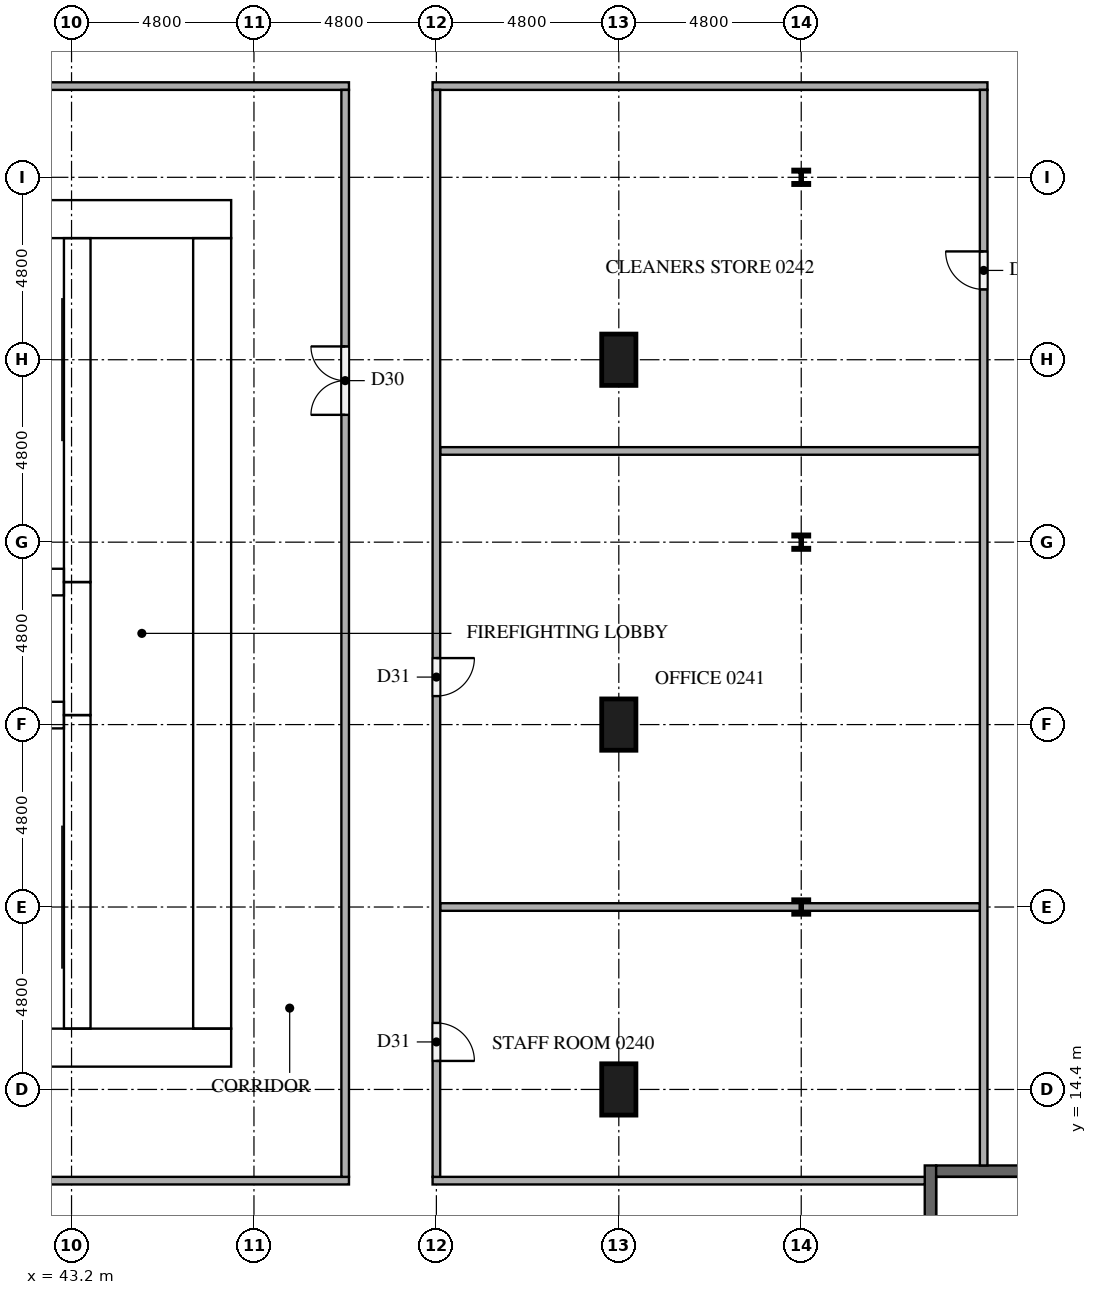
"""IFC4 building model, lengths in metres.
Left out: names, types, materials, properties, quantities, classifications, styles, units other than length and angle.
Written with IfcOpenShell. Run it as: python <this file> out.ifc"""

import sys

from ifc_helpers import new_model, si_unit, direction, frame, frame_2d, origin, origin_2d, place, context, subcontext, project, spatial, rectangle, i_section, extrude, element, fill, save


model = new_model("IFC4")
c1 = context("Model", 3, precision=1e-05, world=origin(), true_north=direction((0.0, 1.0)))
c2 = subcontext(c1, "Body", "Model", "MODEL_VIEW")
j1 = project(units=[si_unit("LENGTHUNIT", "METRE"), si_unit("PLANEANGLEUNIT", "RADIAN")], contexts=[c1])
p1 = place(None, origin())
s1 = spatial("IfcSite", under=j1, at=p1, CompositionType="ELEMENT")
p2 = place(p1, origin())
s2 = spatial("IfcBuilding", under=s1, at=p2, CompositionType="ELEMENT")
p3 = place(p2, frame((0.0, 0.0, 10.5)))
s3 = spatial("IfcBuildingStorey", under=s2, at=p3, CompositionType="ELEMENT", Elevation=10.5)
p4 = place(p3, frame((65.8, 4.4, 0.0), z_axis=(0.0, 0.0, 1.0), x_axis=(0.0, 1.0, 0.0)))
e1 = element("IfcWall", 1, at=p4, inside=s3, PredefinedType="SOLIDWALL", context=c2, shape_type="SweptSolid", body=[
    extrude(rectangle(XDim=8.0, YDim=0.3, at=frame_2d((4.0, 0.0))), origin(), (0.0, 0.0, 1.0), 4.2),
])
p5 = place(p4, frame((0.4, 0.0, 0.0)))
e2 = element("IfcOpeningElement", 2, at=p5, cuts=e1, PredefinedType="OPENING", context=c2, shape_type="SweptSolid", body=[
    extrude(rectangle(XDim=1.4, YDim=2.1, at=frame_2d((0.7, 1.05))), frame((0.0, 0.16, 0.0), z_axis=(0.0, -1.0, 0.0), x_axis=(1.0, 0.0, 0.0)), (0.0, 0.0, 1.0), 0.32),
])
p6 = place(p3, frame((65.95, 12.25, 0.0), z_axis=(0.0, 0.0, 1.0), x_axis=(1.0, 0.0, 0.0)))
e3 = element("IfcWall", 3, at=p6, inside=s3, PredefinedType="SOLIDWALL", context=c2, shape_type="SweptSolid", body=[
    extrude(rectangle(XDim=3.35, YDim=0.3, at=frame_2d((1.675, 0.0))), origin(), (0.0, 0.0, 1.0), 4.2),
])
p7 = place(p3, frame((15.0, 15.5, 0.0), z_axis=(0.0, 0.0, 1.0), x_axis=(1.0, 0.0, 0.0)))
e4 = element("IfcWall", 4, at=p7, inside=s3, PredefinedType="SHEAR", context=c2, shape_type="SweptSolid", body=[
    extrude(rectangle(XDim=32.4, YDim=1.0, at=frame_2d((16.2, 0.0))), origin(), (0.0, 0.0, 1.0), 4.2),
])
p8 = place(p7, frame((15.3, 0.0, 0.0)))
e5 = element("IfcOpeningElement", 5, at=p8, cuts=e4, PredefinedType="OPENING", context=c2, shape_type="SweptSolid", body=[
    extrude(rectangle(XDim=1.8, YDim=2.1, at=frame_2d((0.9, 1.05))), frame((0.0, 0.51, 0.0), z_axis=(0.0, -1.0, 0.0), x_axis=(1.0, 0.0, 0.0)), (0.0, 0.0, 1.0), 1.02),
])
p9 = place(p3, frame((15.0, 37.3, 0.0), z_axis=(0.0, 0.0, 1.0), x_axis=(1.0, 0.0, 0.0)))
e6 = element("IfcWall", 6, at=p9, inside=s3, PredefinedType="SHEAR", context=c2, shape_type="SweptSolid", body=[
    extrude(rectangle(XDim=32.4, YDim=1.0, at=frame_2d((16.2, 0.0))), origin(), (0.0, 0.0, 1.0), 4.2),
])
p10 = place(p9, frame((15.3, 0.0, 0.0)))
e7 = element("IfcOpeningElement", 7, at=p10, cuts=e6, PredefinedType="OPENING", context=c2, shape_type="SweptSolid", body=[
    extrude(rectangle(XDim=1.8, YDim=2.1, at=frame_2d((0.9, 1.05))), frame((0.0, 0.51, 0.0), z_axis=(0.0, -1.0, 0.0), x_axis=(1.0, 0.0, 0.0)), (0.0, 0.0, 1.0), 1.02),
])
p11 = place(p9, frame((1.766, 0.0, 0.0)))
e8 = element("IfcOpeningElement", 8, at=p11, cuts=e6, PredefinedType="OPENING", context=c2, shape_type="SweptSolid", body=[
    extrude(rectangle(XDim=1.0, YDim=2.1, at=frame_2d((0.5, 1.05))), frame((0.0, 0.51, 0.0), z_axis=(0.0, -1.0, 0.0), x_axis=(1.0, 0.0, 0.0)), (0.0, 0.0, 1.0), 1.02),
])
p12 = place(p9, frame((5.241, 0.0, 0.0)))
e9 = element("IfcOpeningElement", 9, at=p12, cuts=e6, PredefinedType="OPENING", context=c2, shape_type="SweptSolid", body=[
    extrude(rectangle(XDim=1.0, YDim=2.1, at=frame_2d((0.5, 1.05))), frame((0.0, 0.51, 0.0), z_axis=(0.0, -1.0, 0.0), x_axis=(1.0, 0.0, 0.0)), (0.0, 0.0, 1.0), 1.02),
])
p13 = place(p3, frame((46.9, 16.0, 0.0), z_axis=(0.0, 0.0, 1.0), x_axis=(0.0, 1.0, 0.0)))
e10 = element("IfcWall", 10, at=p13, inside=s3, PredefinedType="SHEAR", context=c2, shape_type="SweptSolid", body=[
    extrude(rectangle(XDim=20.8, YDim=1.0, at=frame_2d((10.4, 0.0))), origin(), (0.0, 0.0, 1.0), 4.2),
])
p14 = place(p13, frame((10.1, 0.0, 0.0)))
e11 = element("IfcOpeningElement", 11, at=p14, cuts=e10, PredefinedType="OPENING", context=c2, shape_type="SweptSolid", body=[
    extrude(rectangle(XDim=1.2, YDim=2.1, at=frame_2d((0.6, 1.05))), frame((0.0, 0.51, 0.0), z_axis=(0.0, -1.0, 0.0), x_axis=(1.0, 0.0, 0.0)), (0.0, 0.0, 1.0), 1.02),
])
p15 = place(p3, frame((43.35, 16.0, 0.0), z_axis=(0.0, 0.0, 1.0), x_axis=(0.0, 1.0, 0.0)))
e12 = element("IfcWall", 12, at=p15, inside=s3, PredefinedType="SHEAR", context=c2, shape_type="SweptSolid", body=[
    extrude(rectangle(XDim=8.25, YDim=0.7, at=frame_2d((4.125, 0.0))), origin(), (0.0, 0.0, 1.0), 4.2),
])
p16 = place(p15, frame((0.2, 0.0, 0.0)))
e13 = element("IfcOpeningElement", 13, at=p16, cuts=e12, PredefinedType="OPENING", context=c2, shape_type="SweptSolid", body=[
    extrude(rectangle(XDim=1.2, YDim=2.1, at=frame_2d((0.6, 1.05))), frame((0.0, 0.36, 0.0), z_axis=(0.0, -1.0, 0.0), x_axis=(1.0, 0.0, 0.0)), (0.0, 0.0, 1.0), 0.72),
])
p17 = place(p3, frame((43.35, 24.25, 0.0), z_axis=(0.0, 0.0, 1.0), x_axis=(0.0, 1.0, 0.0)))
e14 = element("IfcWall", 14, at=p17, inside=s3, PredefinedType="SHEAR", context=c2, shape_type="SweptSolid", body=[
    extrude(rectangle(XDim=3.5, YDim=0.7, at=frame_2d((1.75, 0.0))), origin(), (0.0, 0.0, 1.0), 4.2),
])
p18 = place(p17, frame((1.2, 0.0, 0.0)))
e15 = element("IfcOpeningElement", 15, at=p18, cuts=e14, PredefinedType="OPENING", context=c2, shape_type="SweptSolid", body=[
    extrude(rectangle(XDim=1.1, YDim=2.1, at=frame_2d((0.55, 1.05))), frame((0.0, 0.36, 0.0), z_axis=(0.0, -1.0, 0.0), x_axis=(1.0, 0.0, 0.0)), (0.0, 0.0, 1.0), 0.72),
])
p19 = place(p3, frame((43.35, 27.75, 0.0), z_axis=(0.0, 0.0, 1.0), x_axis=(0.0, 1.0, 0.0)))
e16 = element("IfcWall", 16, at=p19, inside=s3, PredefinedType="SHEAR", context=c2, shape_type="SweptSolid", body=[
    extrude(rectangle(XDim=9.05, YDim=0.7, at=frame_2d((4.525, 0.0))), origin(), (0.0, 0.0, 1.0), 4.2),
])
p20 = place(p19, frame((7.65, 0.0, 0.0)))
e17 = element("IfcOpeningElement", 17, at=p20, cuts=e16, PredefinedType="OPENING", context=c2, shape_type="SweptSolid", body=[
    extrude(rectangle(XDim=1.2, YDim=2.1, at=frame_2d((0.6, 1.05))), frame((0.0, 0.36, 0.0), z_axis=(0.0, -1.0, 0.0), x_axis=(1.0, 0.0, 0.0)), (0.0, 0.0, 1.0), 0.72),
])
for number, where, z_axis, x_axis in (
    (18, (39.65, 24.25, 0.0), (0.0, 0.0, 1.0), (1.0, 0.0, 0.0)),
    (19, (39.65, 27.75, 0.0), (0.0, 0.0, 1.0), (1.0, 0.0, 0.0)),
):
    element("IfcWall", number, at=place(p3, frame(where, z_axis=z_axis, x_axis=x_axis)), inside=s3, PredefinedType="SHEAR", context=c2, shape_type="SweptSolid", body=[
        extrude(rectangle(XDim=3.35, YDim=0.7, at=frame_2d((1.675, 0.0))), origin(), (0.0, 0.0, 1.0), 4.2),
    ])
for number, where, z_axis, x_axis in (
    (20, (57.6, 14.4, 0.0), (0.0, 0.0, 1.0), (0.0, 1.0, 0.0)),
    (21, (57.6, 24.0, 0.0), (0.0, 0.0, 1.0), (0.0, 1.0, 0.0)),
    (22, (57.6, 33.6, 0.0), (0.0, 0.0, 1.0), (0.0, 1.0, 0.0)),
):
    element("IfcColumn", number, at=place(p3, frame(where, z_axis=z_axis, x_axis=x_axis)), inside=s3, PredefinedType="COLUMN", context=c2, shape_type="SweptSolid", body=[
        extrude(rectangle(XDim=1.35, YDim=0.9, at=origin_2d()), origin(), (0.0, 0.0, 1.0), 4.2),
    ])
for number, where, z_axis, x_axis in (
    (23, (62.4, 19.2, 0.0), (0.0, 0.0, 1.0), (1.0, 0.0, 0.0)),
    (24, (62.4, 28.8, 0.0), (0.0, 0.0, 1.0), (1.0, 0.0, 0.0)),
    (25, (62.4, 38.4, 0.0), (0.0, 0.0, 1.0), (1.0, 0.0, 0.0)),
):
    element("IfcColumn", number, at=place(p3, frame(where, z_axis=z_axis, x_axis=x_axis)), inside=s3, PredefinedType="COLUMN", context=c2, shape_type="SweptSolid", body=[
        extrude(i_section(OverallWidth=0.396, OverallDepth=0.381, WebThickness=0.019, FlangeThickness=0.03, at=origin_2d()), origin(), (0.0, 0.0, 1.0), 4.2),
    ])
p21 = place(p3, frame((11.9, 12.0, 0.0), z_axis=(0.0, 0.0, 1.0), x_axis=(1.0, 0.0, 0.0)))
e26 = element("IfcWall", 26, at=p21, inside=s3, PredefinedType="PARTITIONING", context=c2, shape_type="SweptSolid", body=[
    extrude(rectangle(XDim=38.6, YDim=0.2, at=frame_2d((19.3, 0.0))), origin(), (0.0, 0.0, 1.0), 4.2),
])
p22 = place(p21, frame((18.45, 0.0, 0.0)))
e27 = element("IfcOpeningElement", 27, at=p22, cuts=e26, PredefinedType="OPENING", context=c2, shape_type="SweptSolid", body=[
    extrude(rectangle(XDim=1.8, YDim=2.1, at=frame_2d((0.9, 1.05))), frame((0.0, 0.11, 0.0), z_axis=(0.0, -1.0, 0.0), x_axis=(1.0, 0.0, 0.0)), (0.0, 0.0, 1.0), 0.22),
])
p23 = place(p3, frame((52.7, 12.0, 0.0), z_axis=(0.0, 0.0, 1.0), x_axis=(1.0, 0.0, 0.0)))
e28 = element("IfcWall", 28, at=p23, inside=s3, PredefinedType="PARTITIONING", context=c2, shape_type="SweptSolid", body=[
    extrude(rectangle(XDim=12.95, YDim=0.2, at=frame_2d((6.475, 0.0))), origin(), (0.0, 0.0, 1.0), 4.2),
])
for number, where, z_axis, x_axis in (
    (29, (52.9, 19.2, 0.0), (0.0, 0.0, 1.0), (1.0, 0.0, 0.0)),
    (30, (52.9, 31.2, 0.0), (0.0, 0.0, 1.0), (1.0, 0.0, 0.0)),
):
    element("IfcWall", number, at=place(p3, frame(where, z_axis=z_axis, x_axis=x_axis)), inside=s3, PredefinedType="PARTITIONING", context=c2, shape_type="SweptSolid", body=[
        extrude(rectangle(XDim=14.2, YDim=0.2, at=frame_2d((7.1, 0.0))), origin(), (0.0, 0.0, 1.0), 4.2),
    ])
p24 = place(p3, frame((50.5, 40.8, 0.0), z_axis=(0.0, 0.0, 1.0), x_axis=(-1.0, 0.0, 0.0)))
e31 = element("IfcWall", 31, at=p24, inside=s3, PredefinedType="PARTITIONING", context=c2, shape_type="SweptSolid", body=[
    extrude(rectangle(XDim=38.6, YDim=0.2, at=frame_2d((19.3, 0.0))), origin(), (0.0, 0.0, 1.0), 4.2),
])
p25 = place(p24, frame((18.45, 0.0, 0.0)))
e32 = element("IfcOpeningElement", 32, at=p25, cuts=e31, PredefinedType="OPENING", context=c2, shape_type="SweptSolid", body=[
    extrude(rectangle(XDim=1.8, YDim=2.1, at=frame_2d((0.9, 1.05))), frame((0.0, 0.11, 0.0), z_axis=(0.0, -1.0, 0.0), x_axis=(1.0, 0.0, 0.0)), (0.0, 0.0, 1.0), 0.22),
])
p26 = place(p24, frame((16.25, 0.0, 0.0)))
e33 = element("IfcOpeningElement", 33, at=p26, cuts=e31, PredefinedType="OPENING", context=c2, shape_type="SweptSolid", body=[
    extrude(rectangle(XDim=1.8, YDim=2.1, at=frame_2d((0.9, 1.05))), frame((0.0, 0.11, 0.0), z_axis=(0.0, -1.0, 0.0), x_axis=(1.0, 0.0, 0.0)), (0.0, 0.0, 1.0), 0.22),
])
p27 = place(p3, frame((52.7, 40.8, 0.0), z_axis=(0.0, 0.0, 1.0), x_axis=(1.0, 0.0, 0.0)))
e34 = element("IfcWall", 34, at=p27, inside=s3, PredefinedType="PARTITIONING", context=c2, shape_type="SweptSolid", body=[
    extrude(rectangle(XDim=14.6, YDim=0.2, at=frame_2d((7.3, 0.0))), origin(), (0.0, 0.0, 1.0), 4.2),
])
p28 = place(p3, frame((50.4, 12.1, 0.0), z_axis=(0.0, 0.0, 1.0), x_axis=(0.0, 1.0, 0.0)))
e35 = element("IfcWall", 35, at=p28, inside=s3, PredefinedType="PARTITIONING", context=c2, shape_type="SweptSolid", body=[
    extrude(rectangle(XDim=28.6, YDim=0.2, at=frame_2d((14.3, 0.0))), origin(), (0.0, 0.0, 1.0), 4.2),
])
p29 = place(p28, frame((20.05, 0.0, 0.0)))
e36 = element("IfcOpeningElement", 36, at=p29, cuts=e35, PredefinedType="OPENING", context=c2, shape_type="SweptSolid", body=[
    extrude(rectangle(XDim=1.8, YDim=2.1, at=frame_2d((0.9, 1.05))), frame((0.0, 0.11, 0.0), z_axis=(0.0, -1.0, 0.0), x_axis=(1.0, 0.0, 0.0)), (0.0, 0.0, 1.0), 0.22),
])
p30 = place(p3, frame((52.8, 40.7, 0.0), z_axis=(0.0, 0.0, 1.0), x_axis=(0.0, -1.0, 0.0)))
e37 = element("IfcWall", 37, at=p30, inside=s3, PredefinedType="PARTITIONING", context=c2, shape_type="SweptSolid", body=[
    extrude(rectangle(XDim=28.6, YDim=0.2, at=frame_2d((14.3, 0.0))), origin(), (0.0, 0.0, 1.0), 4.2),
])
p31 = place(p30, frame((24.55, 0.0, 0.0)))
e38 = element("IfcOpeningElement", 38, at=p31, cuts=e37, PredefinedType="OPENING", context=c2, shape_type="SweptSolid", body=[
    extrude(rectangle(XDim=1.0, YDim=2.1, at=frame_2d((0.5, 1.05))), frame((0.0, 0.11, 0.0), z_axis=(0.0, -1.0, 0.0), x_axis=(1.0, 0.0, 0.0)), (0.0, 0.0, 1.0), 0.22),
])
p32 = place(p30, frame((14.95, 0.0, 0.0)))
e39 = element("IfcOpeningElement", 39, at=p32, cuts=e37, PredefinedType="OPENING", context=c2, shape_type="SweptSolid", body=[
    extrude(rectangle(XDim=1.0, YDim=2.1, at=frame_2d((0.5, 1.05))), frame((0.0, 0.11, 0.0), z_axis=(0.0, -1.0, 0.0), x_axis=(1.0, 0.0, 0.0)), (0.0, 0.0, 1.0), 0.22),
])
p33 = place(p3, frame((67.2, 12.4, 0.0), z_axis=(0.0, 0.0, 1.0), x_axis=(0.0, 1.0, 0.0)))
e40 = element("IfcWall", 40, at=p33, inside=s3, PredefinedType="PARTITIONING", context=c2, shape_type="SweptSolid", body=[
    extrude(rectangle(XDim=28.3, YDim=0.2, at=frame_2d((14.15, 0.0))), origin(), (0.0, 0.0, 1.0), 4.2),
])
p34 = place(p33, frame((23.05, 0.0, 0.0)))
e41 = element("IfcOpeningElement", 41, at=p34, cuts=e40, PredefinedType="OPENING", context=c2, shape_type="SweptSolid", body=[
    extrude(rectangle(XDim=1.0, YDim=2.1, at=frame_2d((0.5, 1.05))), frame((0.0, 0.11, 0.0), z_axis=(0.0, -1.0, 0.0), x_axis=(1.0, 0.0, 0.0)), (0.0, 0.0, 1.0), 0.22),
])
p35 = place(p18, origin())
e42 = element("IfcDoor", 42, at=p35, inside=s3, OperationType="DOUBLE_DOOR_SLIDING", PredefinedType="DOOR", context=c2, shape_type="SweptSolid", body=[
    extrude(rectangle(XDim=1.1, YDim=2.1, at=frame_2d((0.55, 1.05))), frame((0.0, 0.025, 0.0), z_axis=(0.0, -1.0, 0.0), x_axis=(1.0, 0.0, 0.0)), (0.0, 0.0, 1.0), 0.05),
])
fill(e15, e42)
p36 = place(p16, origin())
e43 = element("IfcDoor", 43, at=p36, inside=s3, OperationType="SINGLE_SWING_LEFT", PredefinedType="DOOR", context=c2, shape_type="SweptSolid", body=[
    extrude(rectangle(XDim=1.2, YDim=2.1, at=frame_2d((0.6, 1.05))), frame((0.0, 0.025, 0.0), z_axis=(0.0, -1.0, 0.0), x_axis=(1.0, 0.0, 0.0)), (0.0, 0.0, 1.0), 0.05),
])
fill(e13, e43)
p37 = place(p20, origin())
e44 = element("IfcDoor", 44, at=p37, inside=s3, OperationType="SINGLE_SWING_RIGHT", PredefinedType="DOOR", context=c2, shape_type="SweptSolid", body=[
    extrude(rectangle(XDim=1.2, YDim=2.1, at=frame_2d((0.6, 1.05))), frame((0.0, 0.025, 0.0), z_axis=(0.0, -1.0, 0.0), x_axis=(1.0, 0.0, 0.0)), (0.0, 0.0, 1.0), 0.05),
])
fill(e17, e44)
p38 = place(p14, origin())
e45 = element("IfcDoor", 45, at=p38, inside=s3, OperationType="SINGLE_SWING_RIGHT", PredefinedType="DOOR", context=c2, shape_type="SweptSolid", body=[
    extrude(rectangle(XDim=1.2, YDim=2.1, at=frame_2d((0.6, 1.05))), frame((0.0, 0.025, 0.0), z_axis=(0.0, -1.0, 0.0), x_axis=(1.0, 0.0, 0.0)), (0.0, 0.0, 1.0), 0.05),
])
fill(e11, e45)
p39 = place(p31, origin())
e46 = element("IfcDoor", 46, at=p39, inside=s3, OperationType="SINGLE_SWING_RIGHT", PredefinedType="DOOR", context=c2, shape_type="SweptSolid", body=[
    extrude(rectangle(XDim=1.0, YDim=2.1, at=frame_2d((0.5, 1.05))), frame((0.0, 0.025, 0.0), z_axis=(0.0, -1.0, 0.0), x_axis=(1.0, 0.0, 0.0)), (0.0, 0.0, 1.0), 0.05),
])
fill(e38, e46)
p40 = place(p32, origin())
e47 = element("IfcDoor", 47, at=p40, inside=s3, OperationType="SINGLE_SWING_LEFT", PredefinedType="DOOR", context=c2, shape_type="SweptSolid", body=[
    extrude(rectangle(XDim=1.0, YDim=2.1, at=frame_2d((0.5, 1.05))), frame((0.0, 0.025, 0.0), z_axis=(0.0, -1.0, 0.0), x_axis=(1.0, 0.0, 0.0)), (0.0, 0.0, 1.0), 0.05),
])
fill(e39, e47)
p41 = place(p34, origin())
e48 = element("IfcDoor", 48, at=p41, inside=s3, OperationType="SINGLE_SWING_RIGHT", PredefinedType="DOOR", context=c2, shape_type="SweptSolid", body=[
    extrude(rectangle(XDim=1.0, YDim=2.1, at=frame_2d((0.5, 1.05))), frame((0.0, 0.025, 0.0), z_axis=(0.0, -1.0, 0.0), x_axis=(1.0, 0.0, 0.0)), (0.0, 0.0, 1.0), 0.05),
])
fill(e41, e48)
p42 = place(p29, origin())
e49 = element("IfcDoor", 49, at=p42, inside=s3, OperationType="DOUBLE_DOOR_SINGLE_SWING", PredefinedType="DOOR", context=c2, shape_type="SweptSolid", body=[
    extrude(rectangle(XDim=1.8, YDim=2.1, at=frame_2d((0.9, 1.05))), frame((0.0, 0.025, 0.0), z_axis=(0.0, -1.0, 0.0), x_axis=(1.0, 0.0, 0.0)), (0.0, 0.0, 1.0), 0.05),
])
fill(e36, e49)
save(model, sys.argv[1])
